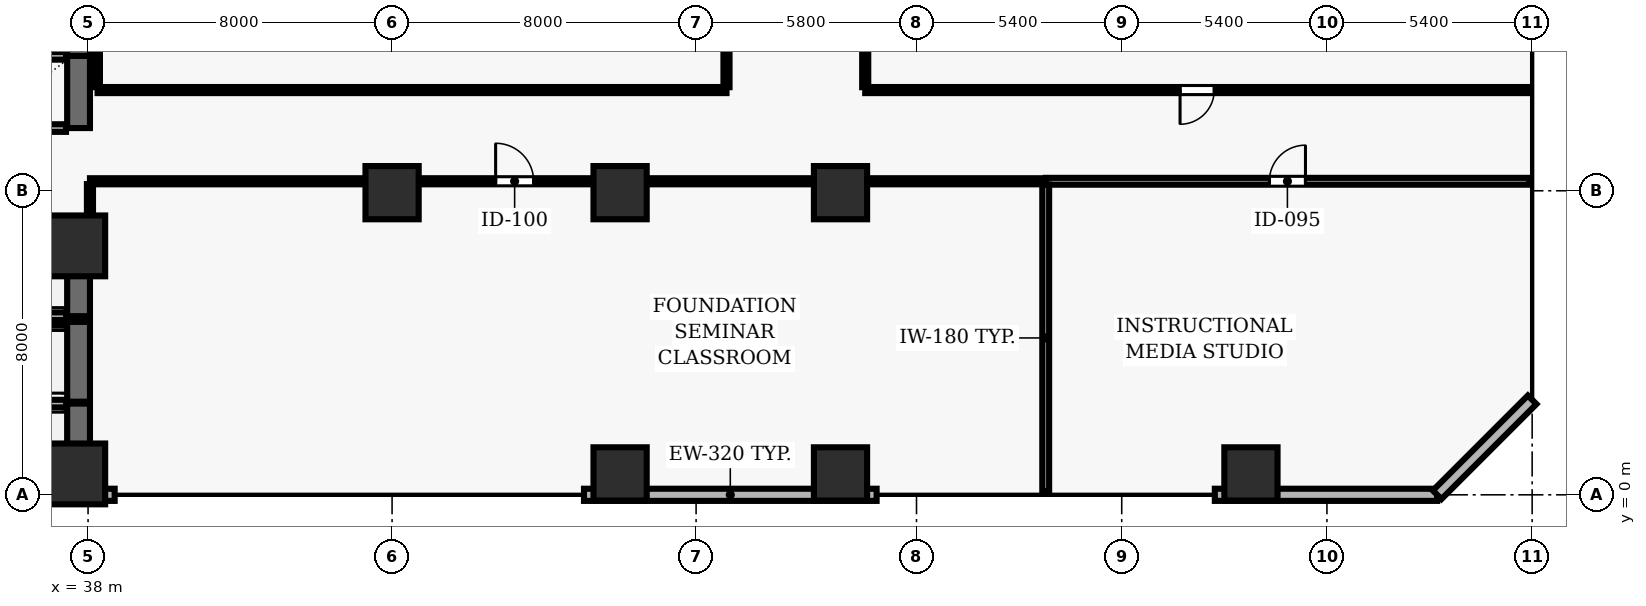
"""IFC4 building model, lengths in metres.
Left out: names, types, materials, properties, quantities, classifications, styles, units other than length and angle.
Written with IfcOpenShell. Run it as: python <this file> out.ifc"""

import sys

from ifc_helpers import new_model, si_unit, direction, frame, frame_2d, origin, origin_2d, place, context, subcontext, project, spatial, rectangle, extrude, element, fill, save


model = new_model("IFC4")
c1 = context("Model", 3, precision=1e-05, world=origin(), true_north=direction((0.0, 1.0)))
c2 = subcontext(c1, "Body", "Model", "MODEL_VIEW")
j1 = project(units=[si_unit("LENGTHUNIT", "METRE"), si_unit("PLANEANGLEUNIT", "RADIAN")], contexts=[c1])
p1 = place(None, origin())
s1 = spatial("IfcSite", under=j1, at=p1, CompositionType="ELEMENT")
p2 = place(p1, origin())
s2 = spatial("IfcBuilding", under=s1, at=p2, CompositionType="ELEMENT")
p3 = place(p2, frame((0.0, 0.0, 20.8)))
s3 = spatial("IfcBuildingStorey", under=s2, at=p3, CompositionType="ELEMENT", Elevation=20.8)
for number, where, z_axis, x_axis in (
    (1, (37.65, 0.55, 0.0), (0.0, 0.0, 1.0), (1.0, 0.0, 0.0)),
    (2, (37.65, 6.55, 0.0), (0.0, 0.0, 1.0), (1.0, 0.0, 0.0)),
):
    element("IfcColumn", number, at=place(p3, frame(where, z_axis=z_axis, x_axis=x_axis)), inside=s3, PredefinedType="COLUMN", context=c2, shape_type="SweptSolid", body=[
        extrude(rectangle(XDim=1.6, YDim=1.6, at=origin_2d()), origin(), (0.0, 0.0, 1.0), 5.2),
    ])
for number, where, z_axis, x_axis in (
    (3, (46.0, 7.95, 0.0), (0.0, 0.0, 1.0), (1.0, 0.0, 0.0)),
    (4, (52.0, 0.55, 0.0), (0.0, 0.0, 1.0), (1.0, 0.0, 0.0)),
    (5, (52.0, 7.95, 0.0), (0.0, 0.0, 1.0), (1.0, 0.0, 0.0)),
    (6, (57.8, 0.55, 0.0), (0.0, 0.0, 1.0), (1.0, 0.0, 0.0)),
    (7, (57.8, 7.95, 0.0), (0.0, 0.0, 1.0), (1.0, 0.0, 0.0)),
    (8, (68.6, 0.55, 0.0), (0.0, 0.0, 1.0), (1.0, 0.0, 0.0)),
):
    element("IfcColumn", number, at=place(p3, frame(where, z_axis=z_axis, x_axis=x_axis)), inside=s3, PredefinedType="COLUMN", context=c2, shape_type="SweptSolid", body=[
        extrude(rectangle(XDim=1.4, YDim=1.4, at=origin_2d()), origin(), (0.0, 0.0, 1.0), 5.2),
    ])
p4 = place(p3, frame((30.7, 0.0, 0.0), z_axis=(0.0, 0.0, 1.0), x_axis=(1.0, 0.0, 0.0)))
e9 = element("IfcWall", 9, at=p4, inside=s3, PredefinedType="SOLIDWALL", context=c2, shape_type="SweptSolid", body=[
    extrude(rectangle(XDim=8.0, YDim=0.32, at=frame_2d((4.0, 0.0))), origin(), (0.0, 0.0, 1.0), 4.78),
])
p5 = place(p3, frame((51.05, 0.0, 0.0), z_axis=(0.0, 0.0, 1.0), x_axis=(1.0, 0.0, 0.0)))
e10 = element("IfcWall", 10, at=p5, inside=s3, PredefinedType="SOLIDWALL", context=c2, shape_type="SweptSolid", body=[
    extrude(rectangle(XDim=7.7, YDim=0.32, at=frame_2d((3.85, 0.0))), origin(), (0.0, 0.0, 1.0), 4.78),
])
p6 = place(p3, frame((67.65, 0.0, 0.0), z_axis=(0.0, 0.0, 1.0), x_axis=(1.0, 0.0, 0.0)))
e11 = element("IfcWall", 11, at=p6, inside=s3, PredefinedType="SOLIDWALL", context=c2, shape_type="SweptSolid", body=[
    extrude(rectangle(XDim=5.85, YDim=0.32, at=frame_2d((2.925, 0.0))), origin(), (0.0, 0.0, 1.0), 4.78),
])
p7 = place(p3, frame((73.5, 0.0, 0.0), z_axis=(0.0, 0.0, 1.0), x_axis=(0.707106781187, 0.707106781187, 0.0)))
e12 = element("IfcWall", 12, at=p7, inside=s3, PredefinedType="SOLIDWALL", context=c2, shape_type="SweptSolid", body=[
    extrude(rectangle(XDim=3.536, YDim=0.32, at=frame_2d((1.768, 0.0))), origin(), (0.0, 0.0, 1.0), 4.78),
])
p8 = place(p3, frame((37.75, 0.3, 0.0), z_axis=(0.0, 0.0, 1.0), x_axis=(0.0, 1.0, 0.0)))
e13 = element("IfcWall", 13, at=p8, inside=s3, PredefinedType="SHEAR", context=c2, shape_type="SweptSolid", body=[
    extrude(rectangle(XDim=2.1, YDim=0.6, at=frame_2d((1.05, 0.0))), origin(), (0.0, 0.0, 1.0), 4.78),
])
for number, where, z_axis, x_axis in (
    (14, (35.28, 0.3, 0.0), (0.0, 0.0, 1.0), (1.0, 0.0, 0.0)),
    (15, (37.42, 2.4, 0.0), (0.0, 0.0, 1.0), (-1.0, 0.0, 0.0)),
):
    element("IfcWall", number, at=place(p3, frame(where, z_axis=z_axis, x_axis=x_axis)), inside=s3, PredefinedType="SOLIDWALL", context=c2, shape_type="SweptSolid", body=[
        extrude(rectangle(XDim=2.14, YDim=0.2, at=frame_2d((1.07, 0.0))), origin(), (0.0, 0.0, 1.0), 4.78),
    ])
p9 = place(p3, frame((37.75, 2.45, 0.0), z_axis=(0.0, 0.0, 1.0), x_axis=(0.0, 1.0, 0.0)))
e16 = element("IfcWall", 16, at=p9, inside=s3, PredefinedType="SHEAR", context=c2, shape_type="SweptSolid", body=[
    extrude(rectangle(XDim=2.1, YDim=0.6, at=frame_2d((1.05, 0.0))), origin(), (0.0, 0.0, 1.0), 4.78),
])
p10 = place(p3, frame((37.42, 4.55, 0.0), z_axis=(0.0, 0.0, 1.0), x_axis=(-1.0, 0.0, 0.0)))
e17 = element("IfcWall", 17, at=p10, inside=s3, PredefinedType="SOLIDWALL", context=c2, shape_type="SweptSolid", body=[
    extrude(rectangle(XDim=2.14, YDim=0.2, at=frame_2d((1.07, 0.0))), origin(), (0.0, 0.0, 1.0), 4.78),
])
p11 = place(p3, frame((37.75, 4.7, 0.0), z_axis=(0.0, 0.0, 1.0), x_axis=(0.0, 1.0, 0.0)))
e18 = element("IfcWall", 18, at=p11, inside=s3, PredefinedType="SHEAR", context=c2, shape_type="SweptSolid", body=[
    extrude(rectangle(XDim=2.25, YDim=0.6, at=frame_2d((1.125, 0.0))), origin(), (0.0, 0.0, 1.0), 4.78),
])
for number, where, z_axis, x_axis in (
    (19, (35.28, 4.7, 0.0), (0.0, 0.0, 1.0), (1.0, 0.0, 0.0)),
    (20, (37.42, 6.95, 0.0), (0.0, 0.0, 1.0), (-1.0, 0.0, 0.0)),
):
    element("IfcWall", number, at=place(p3, frame(where, z_axis=z_axis, x_axis=x_axis)), inside=s3, PredefinedType="SOLIDWALL", context=c2, shape_type="SweptSolid", body=[
        extrude(rectangle(XDim=2.14, YDim=0.2, at=frame_2d((1.07, 0.0))), origin(), (0.0, 0.0, 1.0), 4.78),
    ])
p12 = place(p3, frame((37.75, 9.65, 0.0), z_axis=(0.0, 0.0, 1.0), x_axis=(0.0, 1.0, 0.0)))
e21 = element("IfcWall", 21, at=p12, inside=s3, PredefinedType="SHEAR", context=c2, shape_type="SweptSolid", body=[
    extrude(rectangle(XDim=1.9, YDim=0.6, at=frame_2d((0.95, 0.0))), origin(), (0.0, 0.0, 1.0), 4.78),
])
for number, where, z_axis, x_axis in (
    (22, (35.28, 9.65, 0.0), (0.0, 0.0, 1.0), (1.0, 0.0, 0.0)),
    (23, (37.42, 11.55, 0.0), (0.0, 0.0, 1.0), (-1.0, 0.0, 0.0)),
):
    element("IfcWall", number, at=place(p3, frame(where, z_axis=z_axis, x_axis=x_axis)), inside=s3, PredefinedType="SOLIDWALL", context=c2, shape_type="SweptSolid", body=[
        extrude(rectangle(XDim=2.14, YDim=0.2, at=frame_2d((1.07, 0.0))), origin(), (0.0, 0.0, 1.0), 4.78),
    ])
p13 = place(p3, frame((37.75, 11.55, 0.0), z_axis=(0.0, 0.0, 1.0), x_axis=(0.0, 1.0, 0.0)))
e24 = element("IfcWall", 24, at=p13, inside=s3, PredefinedType="SHEAR", context=c2, shape_type="SweptSolid", body=[
    extrude(rectangle(XDim=2.35, YDim=0.6, at=frame_2d((1.175, 0.0))), origin(), (0.0, 0.0, 1.0), 4.78),
])
p14 = place(p3, frame((38.05, 8.25, 0.0), z_axis=(0.0, 0.0, 1.0), x_axis=(1.0, 0.0, 0.0)))
e25 = element("IfcWall", 25, at=p14, inside=s3, PredefinedType="PARTITIONING", context=c2, shape_type="SweptSolid", body=[
    extrude(rectangle(XDim=25.15, YDim=0.16, at=frame_2d((12.575, 0.0))), origin(), (0.0, 0.0, 1.0), 3.768),
])
p15 = place(p14, frame((10.675, 0.0, 0.0)))
e26 = element("IfcOpeningElement", 26, at=p15, cuts=e25, PredefinedType="OPENING", context=c2, shape_type="SweptSolid", body=[
    extrude(rectangle(XDim=1.0, YDim=2.1, at=frame_2d((0.5, 1.05))), frame((0.0, 0.09, 0.0), z_axis=(0.0, -1.0, 0.0), x_axis=(1.0, 0.0, 0.0)), (0.0, 0.0, 1.0), 0.18),
])
p16 = place(p3, frame((54.8, 10.65, 0.0), z_axis=(0.0, 0.0, 1.0), x_axis=(-1.0, 0.0, 0.0)))
e27 = element("IfcWall", 27, at=p16, inside=s3, PredefinedType="PARTITIONING", context=c2, shape_type="SweptSolid", body=[
    extrude(rectangle(XDim=16.55, YDim=0.16, at=frame_2d((8.275, 0.0))), origin(), (0.0, 0.0, 1.0), 4.229),
])
p17 = place(p3, frame((63.2, 8.25, 0.0), z_axis=(0.0, 0.0, 1.0), x_axis=(1.0, 0.0, 0.0)))
e28 = element("IfcWall", 28, at=p17, inside=s3, PredefinedType="PARTITIONING", context=c2, shape_type="SweptSolid", body=[
    extrude(rectangle(XDim=12.72, YDim=0.18, at=frame_2d((6.36, 0.0))), origin(), (0.0, 0.0, 1.0), 4.78),
])
p18 = place(p17, frame((5.885, 0.0, 0.0)))
e29 = element("IfcOpeningElement", 29, at=p18, cuts=e28, PredefinedType="OPENING", context=c2, shape_type="SweptSolid", body=[
    extrude(rectangle(XDim=0.95, YDim=2.1, at=frame_2d((0.475, 1.05))), frame((0.0, 0.1, 0.0), z_axis=(0.0, -1.0, 0.0), x_axis=(1.0, 0.0, 0.0)), (0.0, 0.0, 1.0), 0.2),
])
p19 = place(p3, frame((75.92, 10.65, 0.0), z_axis=(0.0, 0.0, 1.0), x_axis=(-1.0, 0.0, 0.0)))
e30 = element("IfcWall", 30, at=p19, inside=s3, PredefinedType="PARTITIONING", context=c2, shape_type="SweptSolid", body=[
    extrude(rectangle(XDim=17.47, YDim=0.16, at=frame_2d((8.735, 0.0))), origin(), (0.0, 0.0, 1.0), 4.229),
])
p20 = place(p19, frame((8.285, 0.0, 0.0)))
e31 = element("IfcOpeningElement", 31, at=p20, cuts=e30, PredefinedType="OPENING", context=c2, shape_type="SweptSolid", body=[
    extrude(rectangle(XDim=0.9, YDim=2.1, at=frame_2d((0.45, 1.05))), frame((0.0, 0.09, 0.0), z_axis=(0.0, -1.0, 0.0), x_axis=(1.0, 0.0, 0.0)), (0.0, 0.0, 1.0), 0.18),
])
p21 = place(p3, frame((38.05, 7.05, 0.0), z_axis=(0.0, 0.0, 1.0), x_axis=(0.0, 1.0, 0.0)))
e32 = element("IfcWall", 32, at=p21, inside=s3, PredefinedType="PARTITIONING", context=c2, shape_type="SweptSolid", body=[
    extrude(rectangle(XDim=1.125, YDim=0.16, at=frame_2d((0.562, 0.0))), origin(), (0.0, 0.0, 1.0), 3.768),
])
p22 = place(p3, frame((38.25, 25.925, 0.0), z_axis=(0.0, 0.0, 1.0), x_axis=(0.0, -1.0, 0.0)))
e33 = element("IfcWall", 33, at=p22, inside=s3, PredefinedType="PARTITIONING", context=c2, shape_type="SweptSolid", body=[
    extrude(rectangle(XDim=15.2, YDim=0.125, at=frame_2d((7.6, 0.0))), origin(), (0.0, 0.0, 1.0), 4.78),
])
p23 = place(p3, frame((54.8, 27.925, 0.0), z_axis=(0.0, 0.0, 1.0), x_axis=(0.0, -1.0, 0.0)))
e34 = element("IfcWall", 34, at=p23, inside=s3, PredefinedType="PARTITIONING", context=c2, shape_type="SweptSolid", body=[
    extrude(rectangle(XDim=17.2, YDim=0.16, at=frame_2d((8.6, 0.0))), origin(), (0.0, 0.0, 1.0), 4.229),
])
p24 = place(p23, frame((8.15, 0.0, 0.0)))
e35 = element("IfcOpeningElement", 35, at=p24, cuts=e34, PredefinedType="OPENING", context=c2, shape_type="SweptSolid", body=[
    extrude(rectangle(XDim=0.9, YDim=2.1, at=frame_2d((0.45, 1.05))), frame((0.0, 0.09, 0.0), z_axis=(0.0, -1.0, 0.0), x_axis=(1.0, 0.0, 0.0)), (0.0, 0.0, 1.0), 0.18),
])
p25 = place(p3, frame((58.45, 10.725, 0.0), z_axis=(0.0, 0.0, 1.0), x_axis=(0.0, 1.0, 0.0)))
e36 = element("IfcWall", 36, at=p25, inside=s3, PredefinedType="PARTITIONING", context=c2, shape_type="SweptSolid", body=[
    extrude(rectangle(XDim=13.675, YDim=0.16, at=frame_2d((6.837, 0.0))), origin(), (0.0, 0.0, 1.0), 4.78),
])
p26 = place(p3, frame((63.2, 0.09, 0.0), z_axis=(0.0, 0.0, 1.0), x_axis=(0.0, 1.0, 0.0)))
e37 = element("IfcWall", 37, at=p26, inside=s3, PredefinedType="PARTITIONING", context=c2, shape_type="SweptSolid", body=[
    extrude(rectangle(XDim=8.075, YDim=0.18, at=frame_2d((4.038, 0.0))), origin(), (0.0, 0.0, 1.0), 4.78),
])
p27 = place(p20, origin())
e38 = element("IfcDoor", 38, at=p27, inside=s3, OperationType="SINGLE_SWING_RIGHT", PredefinedType="DOOR", context=c2, shape_type="SweptSolid", body=[
    extrude(rectangle(XDim=0.9, YDim=2.1, at=frame_2d((0.45, 1.05))), frame((0.0, 0.025, 0.0), z_axis=(0.0, -1.0, 0.0), x_axis=(1.0, 0.0, 0.0)), (0.0, 0.0, 1.0), 0.05),
])
fill(e31, e38)
p28 = place(p15, origin())
e39 = element("IfcDoor", 39, at=p28, inside=s3, OperationType="SINGLE_SWING_LEFT", PredefinedType="DOOR", context=c2, shape_type="SweptSolid", body=[
    extrude(rectangle(XDim=1.0, YDim=2.1, at=frame_2d((0.5, 1.05))), frame((0.0, 0.025, 0.0), z_axis=(0.0, -1.0, 0.0), x_axis=(1.0, 0.0, 0.0)), (0.0, 0.0, 1.0), 0.05),
])
fill(e26, e39)
p29 = place(p18, origin())
e40 = element("IfcDoor", 40, at=p29, inside=s3, OperationType="SINGLE_SWING_RIGHT", PredefinedType="DOOR", context=c2, shape_type="SweptSolid", body=[
    extrude(rectangle(XDim=0.95, YDim=2.1, at=frame_2d((0.475, 1.05))), frame((0.0, 0.025, 0.0), z_axis=(0.0, -1.0, 0.0), x_axis=(1.0, 0.0, 0.0)), (0.0, 0.0, 1.0), 0.05),
])
fill(e29, e40)
save(model, sys.argv[1])
